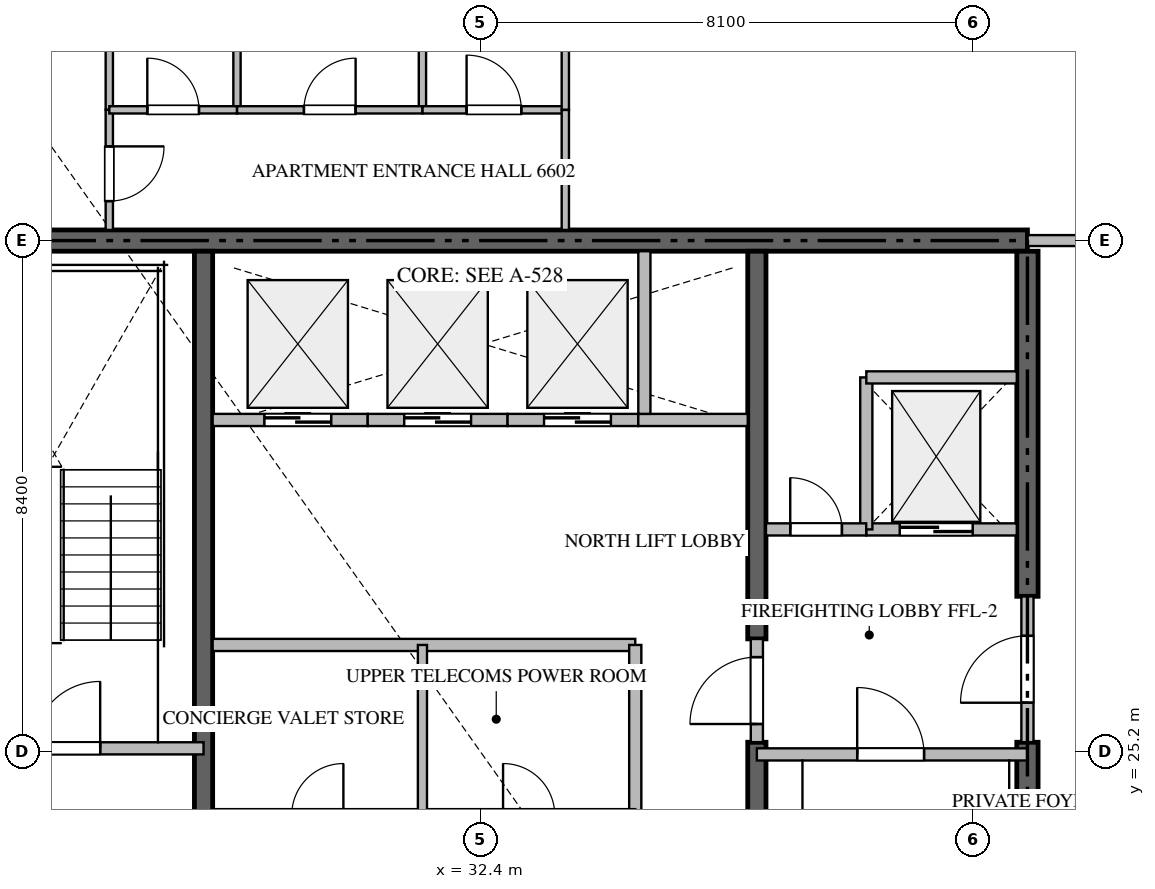
"""IFC4 building model, lengths in metres.
Left out: names, types, materials, properties, quantities, classifications, styles, units other than length and angle.
Written with IfcOpenShell. Run it as: python <this file> out.ifc"""

import sys

from ifc_helpers import new_model, si_unit, direction, frame, frame_2d, origin, place, context, subcontext, project, spatial, rectangle, extrude, source, transform, mapped, element, fill, save


model = new_model("IFC4")
c1 = context("Model", 3, precision=1e-05, world=origin(), true_north=direction((0.0, 1.0)))
c2 = subcontext(c1, "Body", "Model", "MODEL_VIEW")
j1 = project(units=[si_unit("LENGTHUNIT", "METRE"), si_unit("PLANEANGLEUNIT", "RADIAN")], contexts=[c1])
p1 = place(None, origin())
s1 = spatial("IfcSite", under=j1, at=p1, CompositionType="ELEMENT")
p2 = place(p1, origin())
s2 = spatial("IfcBuilding", under=s1, at=p2, CompositionType="ELEMENT")
p3 = place(p2, frame((0.0, 0.0, 264.35)))
s3 = spatial("IfcBuildingStorey", under=s2, at=p3, CompositionType="ELEMENT", Elevation=264.35)
p4 = place(p3, frame((41.4, 33.6, -0.26), z_axis=(0.0, 0.0, 1.0), x_axis=(-1.0, 0.0, 0.0)))
e1 = element("IfcWall", 1, at=p4, inside=s3, PredefinedType="SHEAR", context=c2, shape_type="SweptSolid", body=[
    extrude(rectangle(XDim=18.0, YDim=0.35, at=frame_2d((9.0, 0.0))), origin(), (0.0, 0.0, 1.0), 3.848),
])
p5 = place(p3, frame((41.4, 16.975, -0.26), z_axis=(0.0, 0.0, 1.0), x_axis=(0.0, 1.0, 0.0)))
e2 = element("IfcWall", 2, at=p5, inside=s3, PredefinedType="SHEAR", context=c2, shape_type="SweptSolid", body=[
    extrude(rectangle(XDim=8.375, YDim=0.35, at=frame_2d((4.188, 0.0))), origin(), (0.0, 0.0, 1.0), 3.848),
])
p6 = place(p3, frame((41.4, 27.75, -0.26), z_axis=(0.0, 0.0, 1.0), x_axis=(0.0, 1.0, 0.0)))
e3 = element("IfcWall", 3, at=p6, inside=s3, PredefinedType="SHEAR", context=c2, shape_type="SweptSolid", body=[
    extrude(rectangle(XDim=5.675, YDim=0.35, at=frame_2d((2.837, 0.0))), origin(), (0.0, 0.0, 1.0), 3.848),
])
p7 = place(p3, frame((27.85, 23.55, -0.26), z_axis=(0.0, 0.0, 1.0), x_axis=(0.0, 1.0, 0.0)))
e4 = element("IfcWall", 4, at=p7, inside=s3, PredefinedType="SHEAR", context=c2, shape_type="SweptSolid", body=[
    extrude(rectangle(XDim=9.875, YDim=0.3, at=frame_2d((4.938, 0.0))), origin(), (0.0, 0.0, 1.0), 3.848),
])
p8 = place(p3, frame((36.95, 16.975, -0.26), z_axis=(0.0, 0.0, 1.0), x_axis=(0.0, 1.0, 0.0)))
e5 = element("IfcWall", 5, at=p8, inside=s3, PredefinedType="SHEAR", context=c2, shape_type="SweptSolid", body=[
    extrude(rectangle(XDim=8.375, YDim=0.3, at=frame_2d((4.188, 0.0))), origin(), (0.0, 0.0, 1.0), 3.848),
])
p9 = place(p3, frame((36.95, 27.05, -0.26), z_axis=(0.0, 0.0, 1.0), x_axis=(0.0, 1.0, 0.0)))
e6 = element("IfcWall", 6, at=p9, inside=s3, PredefinedType="SHEAR", context=c2, shape_type="SweptSolid", body=[
    extrude(rectangle(XDim=6.375, YDim=0.3, at=frame_2d((3.188, 0.0))), origin(), (0.0, 0.0, 1.0), 3.848),
])
p10 = place(p3, frame((23.4, 25.25, 0.0), z_axis=(0.0, 0.0, 1.0), x_axis=(1.0, 0.0, 0.0)))
e7 = element("IfcWall", 7, at=p10, inside=s3, PredefinedType="STANDARD", context=c2, shape_type="SweptSolid", body=[
    extrude(rectangle(XDim=4.45, YDim=0.2, at=frame_2d((2.225, 0.0))), origin(), (0.0, 0.0, 1.0), 3.59),
])
p11 = place(p10, frame((1.65, 0.0, 0.0)))
e8 = element("IfcOpeningElement", 8, at=p11, cuts=e7, PredefinedType="OPENING", context=c2, shape_type="SweptSolid", body=[
    extrude(rectangle(XDim=1.1, YDim=2.15, at=frame_2d((0.55, 1.075))), frame((0.0, 0.11, 0.0), z_axis=(0.0, -1.0, 0.0), x_axis=(1.0, 0.0, 0.0)), (0.0, 0.0, 1.0), 0.22),
])
p12 = place(p3, frame((36.95, 25.15, 0.0), z_axis=(0.0, 0.0, 1.0), x_axis=(1.0, 0.0, 0.0)))
e9 = element("IfcWall", 9, at=p12, inside=s3, PredefinedType="STANDARD", context=c2, shape_type="SweptSolid", body=[
    extrude(rectangle(XDim=4.45, YDim=0.2, at=frame_2d((2.225, 0.0))), origin(), (0.0, 0.0, 1.0), 3.59),
])
p13 = place(p12, frame((1.65, 0.0, 0.0)))
e10 = element("IfcOpeningElement", 10, at=p13, cuts=e9, PredefinedType="OPENING", context=c2, shape_type="SweptSolid", body=[
    extrude(rectangle(XDim=1.1, YDim=2.15, at=frame_2d((0.55, 1.075))), frame((0.0, 0.11, 0.0), z_axis=(0.0, -1.0, 0.0), x_axis=(1.0, 0.0, 0.0)), (0.0, 0.0, 1.0), 0.22),
])
p14 = place(p3, frame((38.75, 28.85, 0.0), z_axis=(0.0, 0.0, 1.0), x_axis=(1.0, 0.0, 0.0)))
e11 = element("IfcWall", 11, at=p14, inside=s3, PredefinedType="STANDARD", context=c2, shape_type="SweptSolid", body=[
    extrude(rectangle(XDim=2.475, YDim=0.2, at=frame_2d((1.238, 0.0))), origin(), (0.0, 0.0, 1.0), 3.59),
])
p15 = place(p14, frame((0.55, 0.0, 0.0)))
e12 = element("IfcOpeningElement", 12, at=p15, cuts=e11, PredefinedType="OPENING", context=c2, shape_type="SweptSolid", body=[
    extrude(rectangle(XDim=1.2, YDim=2.2, at=frame_2d((0.6, 1.1))), frame((0.0, 0.11, 0.0), z_axis=(0.0, -1.0, 0.0), x_axis=(1.0, 0.0, 0.0)), (0.0, 0.0, 1.0), 0.22),
])
p16 = place(p3, frame((28.0, 30.65, 0.0), z_axis=(0.0, 0.0, 1.0), x_axis=(1.0, 0.0, 0.0)))
e13 = element("IfcWall", 13, at=p16, inside=s3, PredefinedType="STANDARD", context=c2, shape_type="SweptSolid", body=[
    extrude(rectangle(XDim=2.55, YDim=0.2, at=frame_2d((1.275, 0.0))), origin(), (0.0, 0.0, 1.0), 3.59),
])
p17 = place(p16, frame((0.85, 0.0, 0.0)))
e14 = element("IfcOpeningElement", 14, at=p17, cuts=e13, PredefinedType="OPENING", context=c2, shape_type="SweptSolid", body=[
    extrude(rectangle(XDim=1.1, YDim=2.2, at=frame_2d((0.55, 1.1))), frame((0.0, 0.11, 0.0), z_axis=(0.0, -1.0, 0.0), x_axis=(1.0, 0.0, 0.0)), (0.0, 0.0, 1.0), 0.22),
])
p18 = place(p3, frame((30.55, 30.65, 0.0), z_axis=(0.0, 0.0, 1.0), x_axis=(1.0, 0.0, 0.0)))
e15 = element("IfcWall", 15, at=p18, inside=s3, PredefinedType="STANDARD", context=c2, shape_type="SweptSolid", body=[
    extrude(rectangle(XDim=2.3, YDim=0.2, at=frame_2d((1.15, 0.0))), origin(), (0.0, 0.0, 1.0), 3.59),
])
p19 = place(p18, frame((0.6, 0.0, 0.0)))
e16 = element("IfcOpeningElement", 16, at=p19, cuts=e15, PredefinedType="OPENING", context=c2, shape_type="SweptSolid", body=[
    extrude(rectangle(XDim=1.1, YDim=2.2, at=frame_2d((0.55, 1.1))), frame((0.0, 0.11, 0.0), z_axis=(0.0, -1.0, 0.0), x_axis=(1.0, 0.0, 0.0)), (0.0, 0.0, 1.0), 0.22),
])
p20 = place(p3, frame((32.85, 30.65, 0.0), z_axis=(0.0, 0.0, 1.0), x_axis=(1.0, 0.0, 0.0)))
e17 = element("IfcWall", 17, at=p20, inside=s3, PredefinedType="STANDARD", context=c2, shape_type="SweptSolid", body=[
    extrude(rectangle(XDim=2.15, YDim=0.2, at=frame_2d((1.075, 0.0))), origin(), (0.0, 0.0, 1.0), 3.59),
])
p21 = place(p20, frame((0.6, 0.0, 0.0)))
e18 = element("IfcOpeningElement", 18, at=p21, cuts=e17, PredefinedType="OPENING", context=c2, shape_type="SweptSolid", body=[
    extrude(rectangle(XDim=1.1, YDim=2.2, at=frame_2d((0.55, 1.1))), frame((0.0, 0.11, 0.0), z_axis=(0.0, -1.0, 0.0), x_axis=(1.0, 0.0, 0.0)), (0.0, 0.0, 1.0), 0.22),
])
p22 = place(p3, frame((35.0, 30.65, 0.0), z_axis=(0.0, 0.0, 1.0), x_axis=(1.0, 0.0, 0.0)))
e19 = element("IfcWall", 19, at=p22, inside=s3, PredefinedType="STANDARD", context=c2, shape_type="SweptSolid", body=[
    extrude(rectangle(XDim=1.8, YDim=0.2, at=frame_2d((0.9, 0.0))), origin(), (0.0, 0.0, 1.0), 3.59),
])
p23 = place(p3, frame((35.1, 30.75, 0.0), z_axis=(0.0, 0.0, 1.0), x_axis=(0.0, 1.0, 0.0)))
e20 = element("IfcWall", 20, at=p23, inside=s3, PredefinedType="STANDARD", context=c2, shape_type="SweptSolid", body=[
    extrude(rectangle(XDim=2.675, YDim=0.2, at=frame_2d((1.337, 0.0))), origin(), (0.0, 0.0, 1.0), 3.59),
])
p24 = place(p3, frame((38.75, 28.85, 0.0), z_axis=(0.0, 0.0, 1.0), x_axis=(0.0, 1.0, 0.0)))
e21 = element("IfcWall", 21, at=p24, inside=s3, PredefinedType="STANDARD", context=c2, shape_type="SweptSolid", body=[
    extrude(rectangle(XDim=2.5, YDim=0.2, at=frame_2d((1.25, 0.0))), origin(), (0.0, 0.0, 1.0), 3.59),
])
p25 = place(p3, frame((38.75, 31.35, 0.0), z_axis=(0.0, 0.0, 1.0), x_axis=(1.0, 0.0, 0.0)))
e22 = element("IfcWall", 22, at=p25, inside=s3, PredefinedType="STANDARD", context=c2, shape_type="SweptSolid", body=[
    extrude(rectangle(XDim=2.475, YDim=0.2, at=frame_2d((1.238, 0.0))), origin(), (0.0, 0.0, 1.0), 3.59),
])
p26 = place(p3, frame((37.1, 28.85, 0.0), z_axis=(0.0, 0.0, 1.0), x_axis=(1.0, 0.0, 0.0)))
e23 = element("IfcWall", 23, at=p26, inside=s3, PredefinedType="STANDARD", context=c2, shape_type="SweptSolid", body=[
    extrude(rectangle(XDim=1.648, YDim=0.2, at=frame_2d((0.824, 0.0))), origin(), (0.0, 0.0, 1.0), 3.59),
])
p27 = place(p26, frame((0.399, 0.0, 0.0)))
e24 = element("IfcOpeningElement", 24, at=p27, cuts=e23, PredefinedType="OPENING", context=c2, shape_type="SweptSolid", body=[
    extrude(rectangle(XDim=0.85, YDim=2.1, at=frame_2d((0.425, 1.05))), frame((0.0, 0.11, 0.0), z_axis=(0.0, -1.0, 0.0), x_axis=(1.0, 0.0, 0.0)), (0.0, 0.0, 1.0), 0.22),
])
p28 = place(p3, frame((41.4, 25.352, 0.0), z_axis=(0.0, 0.0, 1.0), x_axis=(0.0, 1.0, 0.0)))
e25 = element("IfcWall", 25, at=p28, inside=s3, PredefinedType="STANDARD", context=c2, shape_type="SweptSolid", body=[
    extrude(rectangle(XDim=2.396, YDim=0.2, at=frame_2d((1.198, 0.0))), origin(), (0.0, 0.0, 1.0), 3.59),
])
p29 = place(p28, frame((0.648, 0.0, 0.0)))
e26 = element("IfcOpeningElement", 26, at=p29, cuts=e25, PredefinedType="OPENING", context=c2, shape_type="SweptSolid", body=[
    extrude(rectangle(XDim=1.1, YDim=2.15, at=frame_2d((0.55, 1.075))), frame((0.0, 0.11, 0.0), z_axis=(0.0, -1.0, 0.0), x_axis=(1.0, 0.0, 0.0)), (0.0, 0.0, 1.0), 0.22),
])
p30 = place(p3, frame((36.95, 25.352, 0.0), z_axis=(0.0, 0.0, 1.0), x_axis=(0.0, 1.0, 0.0)))
e27 = element("IfcWall", 27, at=p30, inside=s3, PredefinedType="STANDARD", context=c2, shape_type="SweptSolid", body=[
    extrude(rectangle(XDim=1.696, YDim=0.2, at=frame_2d((0.848, 0.0))), origin(), (0.0, 0.0, 1.0), 3.59),
])
p31 = place(p30, frame((0.298, 0.0, 0.0)))
e28 = element("IfcOpeningElement", 28, at=p31, cuts=e27, PredefinedType="OPENING", context=c2, shape_type="SweptSolid", body=[
    extrude(rectangle(XDim=1.1, YDim=2.15, at=frame_2d((0.55, 1.075))), frame((0.0, 0.11, 0.0), z_axis=(0.0, -1.0, 0.0), x_axis=(1.0, 0.0, 0.0)), (0.0, 0.0, 1.0), 0.22),
])
p32 = place(p3, frame((28.0, 26.95, 0.0), z_axis=(0.0, 0.0, 1.0), x_axis=(1.0, 0.0, 0.0)))
e29 = element("IfcWall", 29, at=p32, inside=s3, PredefinedType="STANDARD", context=c2, shape_type="SweptSolid", body=[
    extrude(rectangle(XDim=6.95, YDim=0.2, at=frame_2d((3.475, 0.0))), origin(), (0.0, 0.0, 1.0), 3.59),
])
p33 = place(p3, frame((34.95, 24.15, 0.0), z_axis=(0.0, 0.0, 1.0), x_axis=(0.0, 1.0, 0.0)))
e30 = element("IfcWall", 30, at=p33, inside=s3, PredefinedType="STANDARD", context=c2, shape_type="SweptSolid", body=[
    extrude(rectangle(XDim=2.8, YDim=0.2, at=frame_2d((1.4, 0.0))), origin(), (0.0, 0.0, 1.0), 3.59),
])
p34 = place(p3, frame((31.45, 24.15, 0.0), z_axis=(0.0, 0.0, 1.0), x_axis=(0.0, 1.0, 0.0)))
e31 = element("IfcWall", 31, at=p34, inside=s3, PredefinedType="PARTITIONING", context=c2, shape_type="SweptSolid", body=[
    extrude(rectangle(XDim=2.8, YDim=0.15, at=frame_2d((1.4, 0.0))), origin(), (0.0, 0.0, 1.0), 3.59),
])
p35 = place(p3, frame((41.402, 33.6, 0.0), z_axis=(0.0, 0.0, 1.0), x_axis=(1.0, 0.0, 0.0)))
e32 = element("IfcWall", 32, at=p35, inside=s3, PredefinedType="PARTITIONING", context=c2, shape_type="SweptSolid", body=[
    extrude(rectangle(XDim=2.496, YDim=0.18, at=frame_2d((1.248, 0.0))), origin(), (0.0, 0.0, 1.0), 3.59),
])
p36 = place(p3, frame((26.3, 35.75, 0.0), z_axis=(0.0, 0.0, 1.0), x_axis=(0.0, -1.0, 0.0)))
e33 = element("IfcWall", 33, at=p36, inside=s3, PredefinedType="PARTITIONING", context=c2, shape_type="SweptSolid", body=[
    extrude(rectangle(XDim=1.975, YDim=0.12, at=frame_2d((0.988, 0.0))), origin(), (0.0, 0.0, 1.0), 3.59),
])
p37 = place(p36, frame((0.601, 0.0, 0.0)))
e34 = element("IfcOpeningElement", 34, at=p37, cuts=e33, PredefinedType="OPENING", context=c2, shape_type="SweptSolid", body=[
    extrude(rectangle(XDim=0.9, YDim=2.1, at=frame_2d((0.45, 1.05))), frame((0.0, 0.07, 0.0), z_axis=(0.0, -1.0, 0.0), x_axis=(1.0, 0.0, 0.0)), (0.0, 0.0, 1.0), 0.14),
])
p38 = place(p3, frame((26.3, 42.248, 0.0), z_axis=(0.0, 0.0, 1.0), x_axis=(0.0, -1.0, 0.0)))
e35 = element("IfcWall", 35, at=p38, inside=s3, PredefinedType="PARTITIONING", context=c2, shape_type="SweptSolid", body=[
    extrude(rectangle(XDim=6.496, YDim=0.12, at=frame_2d((3.248, 0.0))), origin(), (0.0, 0.0, 1.0), 3.59),
])
p39 = place(p3, frame((31.45, 49.105, 0.0), z_axis=(0.0, 0.0, 1.0), x_axis=(0.0, -1.0, 0.0)))
e36 = element("IfcWall", 36, at=p39, inside=s3, PredefinedType="PARTITIONING", context=c2, shape_type="SweptSolid", body=[
    extrude(rectangle(XDim=13.355, YDim=0.12, at=frame_2d((6.677, 0.0))), origin(), (0.0, 0.0, 1.0), 3.59),
])
p40 = place(p3, frame((28.4, 42.25, 0.0), z_axis=(0.0, 0.0, 1.0), x_axis=(0.0, -1.0, 0.0)))
e37 = element("IfcWall", 37, at=p40, inside=s3, PredefinedType="PARTITIONING", context=c2, shape_type="SweptSolid", body=[
    extrude(rectangle(XDim=6.5, YDim=0.12, at=frame_2d((3.25, 0.0))), origin(), (0.0, 0.0, 1.0), 3.59),
])
p41 = place(p3, frame((26.3, 35.75, 0.0), z_axis=(0.0, 0.0, 1.0), x_axis=(1.0, 0.0, 0.0)))
e38 = element("IfcWall", 38, at=p41, inside=s3, PredefinedType="PARTITIONING", context=c2, shape_type="SweptSolid", body=[
    extrude(rectangle(XDim=2.1, YDim=0.12, at=frame_2d((1.05, 0.0))), origin(), (0.0, 0.0, 1.0), 3.59),
])
p42 = place(p41, frame((0.625, 0.0, 0.0)))
e39 = element("IfcOpeningElement", 39, at=p42, cuts=e38, PredefinedType="OPENING", context=c2, shape_type="SweptSolid", body=[
    extrude(rectangle(XDim=0.85, YDim=2.1, at=frame_2d((0.425, 1.05))), frame((0.0, 0.07, 0.0), z_axis=(0.0, -1.0, 0.0), x_axis=(1.0, 0.0, 0.0)), (0.0, 0.0, 1.0), 0.14),
])
p43 = place(p3, frame((28.402, 35.75, 0.0), z_axis=(0.0, 0.0, 1.0), x_axis=(1.0, 0.0, 0.0)))
e40 = element("IfcWall", 40, at=p43, inside=s3, PredefinedType="PARTITIONING", context=c2, shape_type="SweptSolid", body=[
    extrude(rectangle(XDim=3.048, YDim=0.12, at=frame_2d((1.524, 0.0))), origin(), (0.0, 0.0, 1.0), 3.59),
])
p44 = place(p43, frame((1.099, 0.0, 0.0)))
e41 = element("IfcOpeningElement", 41, at=p44, cuts=e40, PredefinedType="OPENING", context=c2, shape_type="SweptSolid", body=[
    extrude(rectangle(XDim=0.85, YDim=2.1, at=frame_2d((0.425, 1.05))), frame((0.0, 0.07, 0.0), z_axis=(0.0, -1.0, 0.0), x_axis=(1.0, 0.0, 0.0)), (0.0, 0.0, 1.0), 0.14),
])
p45 = place(p3, frame((31.452, 35.75, 0.0), z_axis=(0.0, 0.0, 1.0), x_axis=(1.0, 0.0, 0.0)))
e42 = element("IfcWall", 42, at=p45, inside=s3, PredefinedType="PARTITIONING", context=c2, shape_type="SweptSolid", body=[
    extrude(rectangle(XDim=2.348, YDim=0.12, at=frame_2d((1.174, 0.0))), origin(), (0.0, 0.0, 1.0), 3.59),
])
p46 = place(p45, frame((0.724, 0.0, 0.0)))
e43 = element("IfcOpeningElement", 43, at=p46, cuts=e42, PredefinedType="OPENING", context=c2, shape_type="SweptSolid", body=[
    extrude(rectangle(XDim=0.9, YDim=2.1, at=frame_2d((0.45, 1.05))), frame((0.0, 0.07, 0.0), z_axis=(0.0, -1.0, 0.0), x_axis=(1.0, 0.0, 0.0)), (0.0, 0.0, 1.0), 0.14),
])
p47 = place(p3, frame((33.8, 41.81, 0.0), z_axis=(0.0, 0.0, 1.0), x_axis=(0.0, -1.0, 0.0)))
e44 = element("IfcWall", 44, at=p47, inside=s3, PredefinedType="PARTITIONING", context=c2, shape_type="SweptSolid", body=[
    extrude(rectangle(XDim=6.06, YDim=0.12, at=frame_2d((3.03, 0.0))), origin(), (0.0, 0.0, 1.0), 3.59),
])
p48 = place(p47, frame((2.605, 0.0, 0.0)))
e45 = element("IfcOpeningElement", 45, at=p48, cuts=e44, PredefinedType="OPENING", context=c2, shape_type="SweptSolid", body=[
    extrude(rectangle(XDim=0.85, YDim=2.1, at=frame_2d((0.425, 1.05))), frame((0.0, 0.07, 0.0), z_axis=(0.0, -1.0, 0.0), x_axis=(1.0, 0.0, 0.0)), (0.0, 0.0, 1.0), 0.14),
])
p49 = place(p3, frame((33.8, 35.748, 0.0), z_axis=(0.0, 0.0, 1.0), x_axis=(0.0, -1.0, 0.0)))
e46 = element("IfcWall", 46, at=p49, inside=s3, PredefinedType="PARTITIONING", context=c2, shape_type="SweptSolid", body=[
    extrude(rectangle(XDim=1.973, YDim=0.12, at=frame_2d((0.987, 0.0))), origin(), (0.0, 0.0, 1.0), 3.59),
])
m1 = source(origin(), c2, "Body", "SweptSolid", [
    extrude(rectangle(XDim=1.1, YDim=2.15, at=frame_2d((0.55, 1.075))), frame((0.0, 0.025, 0.0), z_axis=(0.0, -1.0, 0.0), x_axis=(1.0, 0.0, 0.0)), (0.0, 0.0, 1.0), 0.05),
])
p50 = place(p11, origin())
e47 = element("IfcDoor", 47, at=p50, inside=s3, OperationType="SINGLE_SWING_RIGHT", PredefinedType="DOOR", context=c2, shape_type="MappedRepresentation", body=[
    mapped(m1, transform((0.0, 0.0, 0.0), scale=1.0)),
])
fill(e8, e47)
p51 = place(p13, origin())
e48 = element("IfcDoor", 48, at=p51, inside=s3, OperationType="SINGLE_SWING_LEFT", PredefinedType="DOOR", context=c2, shape_type="MappedRepresentation", body=[
    mapped(m1, transform((0.0, 0.0, 0.0), scale=1.0)),
])
fill(e10, e48)
m2 = source(origin(), c2, "Body", "SweptSolid", [
    extrude(rectangle(XDim=1.2, YDim=2.2, at=frame_2d((0.6, 1.1))), frame((0.0, 0.025, 0.0), z_axis=(0.0, -1.0, 0.0), x_axis=(1.0, 0.0, 0.0)), (0.0, 0.0, 1.0), 0.05),
])
p52 = place(p15, origin())
e49 = element("IfcDoor", 49, at=p52, inside=s3, OperationType="DOUBLE_DOOR_SLIDING", PredefinedType="DOOR", context=c2, shape_type="MappedRepresentation", body=[
    mapped(m2, transform((0.0, 0.0, 0.0), scale=1.0)),
])
fill(e12, e49)
m3 = source(origin(), c2, "Body", "SweptSolid", [
    extrude(rectangle(XDim=1.1, YDim=2.2, at=frame_2d((0.55, 1.1))), frame((0.0, 0.025, 0.0), z_axis=(0.0, -1.0, 0.0), x_axis=(1.0, 0.0, 0.0)), (0.0, 0.0, 1.0), 0.05),
])
p53 = place(p17, origin())
e50 = element("IfcDoor", 50, at=p53, inside=s3, OperationType="DOUBLE_DOOR_SLIDING", PredefinedType="DOOR", context=c2, shape_type="MappedRepresentation", body=[
    mapped(m3, transform((0.0, 0.0, 0.0), scale=1.0)),
])
fill(e14, e50)
p54 = place(p19, origin())
e51 = element("IfcDoor", 51, at=p54, inside=s3, OperationType="DOUBLE_DOOR_SLIDING", PredefinedType="DOOR", context=c2, shape_type="MappedRepresentation", body=[
    mapped(m3, transform((0.0, 0.0, 0.0), scale=1.0)),
])
fill(e16, e51)
p55 = place(p21, origin())
e52 = element("IfcDoor", 52, at=p55, inside=s3, OperationType="DOUBLE_DOOR_SLIDING", PredefinedType="DOOR", context=c2, shape_type="MappedRepresentation", body=[
    mapped(m3, transform((0.0, 0.0, 0.0), scale=1.0)),
])
fill(e18, e52)
m4 = source(origin(), c2, "Body", "SweptSolid", [
    extrude(rectangle(XDim=0.85, YDim=2.1, at=frame_2d((0.425, 1.05))), frame((0.0, 0.025, 0.0), z_axis=(0.0, -1.0, 0.0), x_axis=(1.0, 0.0, 0.0)), (0.0, 0.0, 1.0), 0.05),
])
p56 = place(p27, origin())
e53 = element("IfcDoor", 53, at=p56, inside=s3, OperationType="SINGLE_SWING_LEFT", PredefinedType="DOOR", context=c2, shape_type="MappedRepresentation", body=[
    mapped(m4, transform((0.0, 0.0, 0.0), scale=1.0)),
])
fill(e24, e53)
p57 = place(p29, origin())
e54 = element("IfcDoor", 54, at=p57, inside=s3, OperationType="SINGLE_SWING_LEFT", PredefinedType="DOOR", context=c2, shape_type="MappedRepresentation", body=[
    mapped(m1, transform((0.0, 0.0, 0.0), scale=1.0)),
])
fill(e26, e54)
p58 = place(p31, origin())
e55 = element("IfcDoor", 55, at=p58, inside=s3, OperationType="SINGLE_SWING_LEFT", PredefinedType="DOOR", context=c2, shape_type="MappedRepresentation", body=[
    mapped(m1, transform((0.0, 0.0, 0.0), scale=1.0)),
])
fill(e28, e55)
m5 = source(origin(), c2, "Body", "SweptSolid", [
    extrude(rectangle(XDim=0.9, YDim=2.1, at=frame_2d((0.45, 1.05))), frame((0.0, 0.025, 0.0), z_axis=(0.0, -1.0, 0.0), x_axis=(1.0, 0.0, 0.0)), (0.0, 0.0, 1.0), 0.05),
])
p59 = place(p37, origin())
e56 = element("IfcDoor", 56, at=p59, inside=s3, OperationType="SINGLE_SWING_LEFT", PredefinedType="DOOR", context=c2, shape_type="MappedRepresentation", body=[
    mapped(m5, transform((0.0, 0.0, 0.0), scale=1.0)),
])
fill(e34, e56)
p60 = place(p42, origin())
e57 = element("IfcDoor", 57, at=p60, inside=s3, OperationType="SINGLE_SWING_LEFT", PredefinedType="DOOR", context=c2, shape_type="MappedRepresentation", body=[
    mapped(m4, transform((0.0, 0.0, 0.0), scale=1.0)),
])
fill(e39, e57)
p61 = place(p44, origin())
e58 = element("IfcDoor", 58, at=p61, inside=s3, OperationType="SINGLE_SWING_RIGHT", PredefinedType="DOOR", context=c2, shape_type="MappedRepresentation", body=[
    mapped(m4, transform((0.0, 0.0, 0.0), scale=1.0)),
])
fill(e41, e58)
p62 = place(p46, origin())
e59 = element("IfcDoor", 59, at=p62, inside=s3, OperationType="SINGLE_SWING_LEFT", PredefinedType="DOOR", context=c2, shape_type="MappedRepresentation", body=[
    mapped(m5, transform((0.0, 0.0, 0.0), scale=1.0)),
])
fill(e43, e59)
save(model, sys.argv[1])
